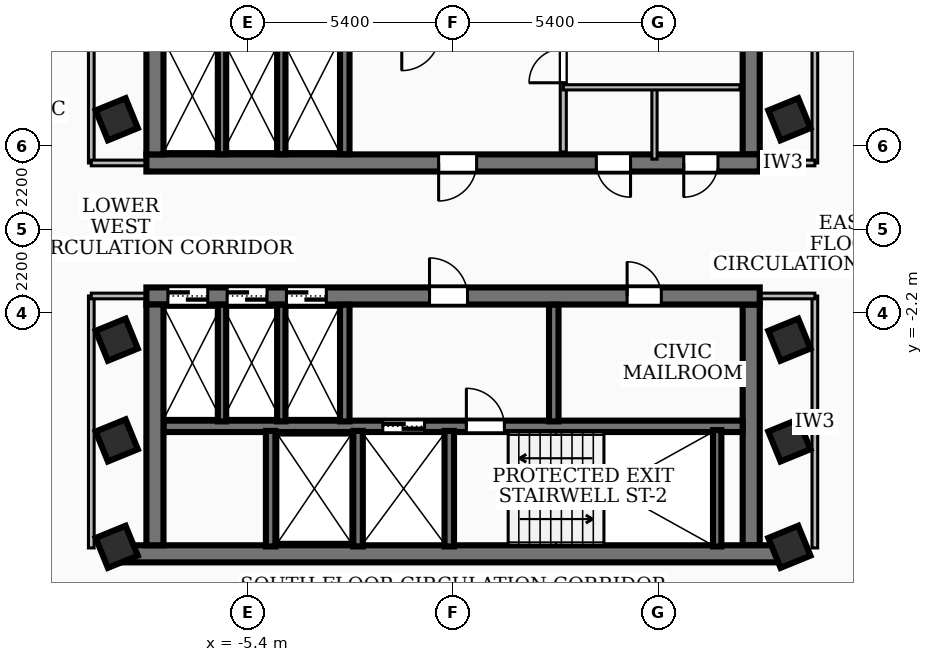
"""IFC4 building model, lengths in metres.
Left out: names, types, materials, properties, quantities, classifications, styles, units other than length and angle.
Written with IfcOpenShell. Run it as: python <this file> out.ifc"""

import sys

from ifc_helpers import new_model, si_unit, direction, frame, frame_2d, origin, origin_2d, place, context, subcontext, project, spatial, rectangle, extrude, element, fill, save


model = new_model("IFC4")
c1 = context("Model", 3, precision=1e-05, world=origin(), true_north=direction((0.0, 1.0)))
c2 = subcontext(c1, "Body", "Model", "MODEL_VIEW")
j1 = project(units=[si_unit("LENGTHUNIT", "METRE"), si_unit("PLANEANGLEUNIT", "RADIAN")], contexts=[c1])
p1 = place(None, origin())
s1 = spatial("IfcSite", under=j1, at=p1, CompositionType="ELEMENT")
p2 = place(p1, origin())
s2 = spatial("IfcBuilding", under=s1, at=p2, CompositionType="ELEMENT")
p3 = place(p2, frame((0.0, 0.0, 177.48)))
s3 = spatial("IfcBuildingStorey", under=s2, at=p3, CompositionType="ELEMENT", Elevation=177.48)
p4 = place(p3, frame((8.07, 1.75, 0.0), z_axis=(0.0, 0.0, 1.0), x_axis=(-1.0, 0.0, 0.0)))
e1 = element("IfcWall", 1, at=p4, inside=s3, PredefinedType="SHEAR", context=c2, shape_type="SweptSolid", body=[
    extrude(rectangle(XDim=16.14, YDim=0.45, at=frame_2d((8.07, 0.0))), origin(), (0.0, 0.0, 1.0), 3.34),
])
p5 = place(p4, frame((7.45, 0.0, 0.0)))
e2 = element("IfcOpeningElement", 2, at=p5, cuts=e1, PredefinedType="OPENING", context=c2, shape_type="SweptSolid", body=[
    extrude(rectangle(XDim=1.0, YDim=2.1, at=frame_2d((0.5, 1.05))), frame((0.0, 0.235, 0.0), z_axis=(0.0, -1.0, 0.0), x_axis=(1.0, 0.0, 0.0)), (0.0, 0.0, 1.0), 0.47),
])
p6 = place(p4, frame((3.4, 0.0, 0.0)))
e3 = element("IfcOpeningElement", 3, at=p6, cuts=e1, PredefinedType="OPENING", context=c2, shape_type="SweptSolid", body=[
    extrude(rectangle(XDim=0.9, YDim=2.06, at=frame_2d((0.45, 1.03))), frame((0.0, 0.235, 0.0), z_axis=(0.0, -1.0, 0.0), x_axis=(1.0, 0.0, 0.0)), (0.0, 0.0, 1.0), 0.47),
])
p7 = place(p4, frame((1.1, 0.0, 0.0)))
e4 = element("IfcOpeningElement", 4, at=p7, cuts=e1, PredefinedType="OPENING", context=c2, shape_type="SweptSolid", body=[
    extrude(rectangle(XDim=0.9, YDim=2.06, at=frame_2d((0.45, 1.03))), frame((0.0, 0.235, 0.0), z_axis=(0.0, -1.0, 0.0), x_axis=(1.0, 0.0, 0.0)), (0.0, 0.0, 1.0), 0.47),
])
for number, where, z_axis, x_axis in (
    (5, (-7.845, 1.975, 0.0), (0.0, 0.0, 1.0), (0.0, 1.0, 0.0)),
    (6, (7.845, 8.31, 0.0), (0.0, 0.0, 1.0), (0.0, -1.0, 0.0)),
):
    element("IfcWall", number, at=place(p3, frame(where, z_axis=z_axis, x_axis=x_axis)), inside=s3, PredefinedType="SHEAR", context=c2, shape_type="SweptSolid", body=[
        extrude(rectangle(XDim=6.335, YDim=0.45, at=frame_2d((3.167, 0.0))), origin(), (0.0, 0.0, 1.0), 3.34),
    ])
p8 = place(p3, frame((8.78, -8.535, 0.0), z_axis=(0.0, 0.0, 1.0), x_axis=(-1.0, 0.0, 0.0)))
e7 = element("IfcWall", 7, at=p8, inside=s3, PredefinedType="SHEAR", context=c2, shape_type="SweptSolid", body=[
    extrude(rectangle(XDim=17.56, YDim=0.45, at=frame_2d((8.78, 0.0))), origin(), (0.0, 0.0, 1.0), 3.34),
])
p9 = place(p3, frame((-8.07, -1.75, 0.0), z_axis=(0.0, 0.0, 1.0), x_axis=(1.0, 0.0, 0.0)))
e8 = element("IfcWall", 8, at=p9, inside=s3, PredefinedType="SHEAR", context=c2, shape_type="SweptSolid", body=[
    extrude(rectangle(XDim=16.14, YDim=0.45, at=frame_2d((8.07, 0.0))), origin(), (0.0, 0.0, 1.0), 3.34),
])
p10 = place(p9, frame((7.45, 0.0, 0.0)))
e9 = element("IfcOpeningElement", 9, at=p10, cuts=e8, PredefinedType="OPENING", context=c2, shape_type="SweptSolid", body=[
    extrude(rectangle(XDim=1.0, YDim=2.1, at=frame_2d((0.5, 1.05))), frame((0.0, 0.235, 0.0), z_axis=(0.0, -1.0, 0.0), x_axis=(1.0, 0.0, 0.0)), (0.0, 0.0, 1.0), 0.47),
])
p11 = place(p9, frame((12.65, 0.0, 0.0)))
e10 = element("IfcOpeningElement", 10, at=p11, cuts=e8, PredefinedType="OPENING", context=c2, shape_type="SweptSolid", body=[
    extrude(rectangle(XDim=0.9, YDim=2.06, at=frame_2d((0.45, 1.03))), frame((0.0, 0.235, 0.0), z_axis=(0.0, -1.0, 0.0), x_axis=(1.0, 0.0, 0.0)), (0.0, 0.0, 1.0), 0.47),
])
p12 = place(p9, frame((0.565, 0.0, 0.0)))
e11 = element("IfcOpeningElement", 11, at=p12, cuts=e8, PredefinedType="OPENING", context=c2, shape_type="SweptSolid", body=[
    extrude(rectangle(XDim=1.05, YDim=2.15, at=frame_2d((0.525, 1.075))), frame((0.0, 0.235, 0.0), z_axis=(0.0, -1.0, 0.0), x_axis=(1.0, 0.0, 0.0)), (0.0, 0.0, 1.0), 0.47),
])
p13 = place(p9, frame((2.125, 0.0, 0.0)))
e12 = element("IfcOpeningElement", 12, at=p13, cuts=e8, PredefinedType="OPENING", context=c2, shape_type="SweptSolid", body=[
    extrude(rectangle(XDim=1.05, YDim=2.15, at=frame_2d((0.525, 1.075))), frame((0.0, 0.235, 0.0), z_axis=(0.0, -1.0, 0.0), x_axis=(1.0, 0.0, 0.0)), (0.0, 0.0, 1.0), 0.47),
])
p14 = place(p9, frame((3.685, 0.0, 0.0)))
e13 = element("IfcOpeningElement", 13, at=p14, cuts=e8, PredefinedType="OPENING", context=c2, shape_type="SweptSolid", body=[
    extrude(rectangle(XDim=1.05, YDim=2.15, at=frame_2d((0.525, 1.075))), frame((0.0, 0.235, 0.0), z_axis=(0.0, -1.0, 0.0), x_axis=(1.0, 0.0, 0.0)), (0.0, 0.0, 1.0), 0.47),
])
for number, where, z_axis, x_axis in (
    (14, (-7.845, -8.31, 0.0), (0.0, 0.0, 1.0), (0.0, 1.0, 0.0)),
    (15, (7.845, -1.975, 0.0), (0.0, 0.0, 1.0), (0.0, -1.0, 0.0)),
):
    element("IfcWall", number, at=place(p3, frame(where, z_axis=z_axis, x_axis=x_axis)), inside=s3, PredefinedType="SHEAR", context=c2, shape_type="SweptSolid", body=[
        extrude(rectangle(XDim=6.335, YDim=0.45, at=frame_2d((3.167, 0.0))), origin(), (0.0, 0.0, 1.0), 3.34),
    ])
p15 = place(p3, frame((-7.62, -5.18, 0.0), z_axis=(0.0, 0.0, 1.0), x_axis=(1.0, 0.0, 0.0)))
e16 = element("IfcWall", 16, at=p15, inside=s3, PredefinedType="SOLIDWALL", context=c2, shape_type="SweptSolid", body=[
    extrude(rectangle(XDim=15.24, YDim=0.3, at=frame_2d((7.62, 0.0))), origin(), (0.0, 0.0, 1.0), 3.34),
])
p16 = place(p15, frame((5.77, 0.0, 0.0)))
e17 = element("IfcOpeningElement", 17, at=p16, cuts=e16, PredefinedType="OPENING", context=c2, shape_type="SweptSolid", body=[
    extrude(rectangle(XDim=1.1, YDim=2.15, at=frame_2d((0.55, 1.075))), frame((0.0, 0.16, 0.0), z_axis=(0.0, -1.0, 0.0), x_axis=(1.0, 0.0, 0.0)), (0.0, 0.0, 1.0), 0.32),
])
p17 = place(p15, frame((7.97, 0.0, 0.0)))
e18 = element("IfcOpeningElement", 18, at=p17, cuts=e16, PredefinedType="OPENING", context=c2, shape_type="SweptSolid", body=[
    extrude(rectangle(XDim=1.0, YDim=2.1, at=frame_2d((0.5, 1.05))), frame((0.0, 0.16, 0.0), z_axis=(0.0, -1.0, 0.0), x_axis=(1.0, 0.0, 0.0)), (0.0, 0.0, 1.0), 0.32),
])
p18 = place(p3, frame((6.95, -8.34, 0.0), z_axis=(0.0, 0.0, 1.0), x_axis=(0.0, 1.0, 0.0)))
e19 = element("IfcWall", 19, at=p18, inside=s3, PredefinedType="SOLIDWALL", context=c2, shape_type="SweptSolid", body=[
    extrude(rectangle(XDim=3.06, YDim=0.22, at=frame_2d((1.53, 0.0))), origin(), (0.0, 0.0, 1.0), 3.34),
])
p19 = place(p3, frame((-2.85, 1.98, 0.0), z_axis=(0.0, 0.0, 1.0), x_axis=(0.0, 1.0, 0.0)))
e20 = element("IfcWall", 20, at=p19, inside=s3, PredefinedType="SOLIDWALL", context=c2, shape_type="SweptSolid", body=[
    extrude(rectangle(XDim=3.07, YDim=0.25, at=frame_2d((1.535, 0.0))), origin(), (0.0, 0.0, 1.0), 3.34),
])
for number, where, z_axis, x_axis in (
    (21, (-0.1, -8.34, 0.0), (0.0, 0.0, 1.0), (0.0, 1.0, 0.0)),
    (22, (-2.5, -8.34, 0.0), (0.0, 0.0, 1.0), (0.0, 1.0, 0.0)),
    (23, (-4.8, -8.34, 0.0), (0.0, 0.0, 1.0), (0.0, 1.0, 0.0)),
):
    element("IfcWall", number, at=place(p3, frame(where, z_axis=z_axis, x_axis=x_axis)), inside=s3, PredefinedType="SOLIDWALL", context=c2, shape_type="SweptSolid", body=[
        extrude(rectangle(XDim=3.04, YDim=0.25, at=frame_2d((1.52, 0.0))), origin(), (0.0, 0.0, 1.0), 3.34),
    ])
for number, where, z_axis, x_axis in (
    (24, (-2.85, -5.05, 0.0), (0.0, 0.0, 1.0), (0.0, 1.0, 0.0)),
    (25, (2.65, -5.05, 0.0), (0.0, 0.0, 1.0), (0.0, 1.0, 0.0)),
):
    element("IfcWall", number, at=place(p3, frame(where, z_axis=z_axis, x_axis=x_axis)), inside=s3, PredefinedType="SOLIDWALL", context=c2, shape_type="SweptSolid", body=[
        extrude(rectangle(XDim=3.07, YDim=0.25, at=frame_2d((1.535, 0.0))), origin(), (0.0, 0.0, 1.0), 3.34),
    ])
for number, where, z_axis, x_axis in (
    (26, (-6.08, 1.98, 0.0), (0.0, 0.0, 1.0), (0.0, 1.0, 0.0)),
    (27, (-4.52, 1.98, 0.0), (0.0, 0.0, 1.0), (0.0, 1.0, 0.0)),
    (28, (-6.08, -5.05, 0.0), (0.0, 0.0, 1.0), (0.0, 1.0, 0.0)),
    (29, (-4.52, -5.05, 0.0), (0.0, 0.0, 1.0), (0.0, 1.0, 0.0)),
):
    element("IfcWall", number, at=place(p3, frame(where, z_axis=z_axis, x_axis=x_axis)), inside=s3, PredefinedType="SOLIDWALL", context=c2, shape_type="SweptSolid", body=[
        extrude(rectangle(XDim=3.07, YDim=0.22, at=frame_2d((1.535, 0.0))), origin(), (0.0, 0.0, 1.0), 3.34),
    ])
for number, where, z_axis, x_axis in (
    (30, (-8.85, -5.55, 0.0), (0.0, 0.0, 1.0), (0.926, 0.378, 0.0)),
    (31, (-8.85, -2.9, 0.0), (0.0, 0.0, 1.0), (0.926, 0.378, 0.0)),
    (32, (-8.85, 2.9, 0.0), (0.0, 0.0, 1.0), (0.926, 0.378, 0.0)),
    (33, (8.85, -5.55, 0.0), (0.0, 0.0, 1.0), (0.926, 0.378, 0.0)),
    (34, (8.85, -2.9, 0.0), (0.0, 0.0, 1.0), (0.926, 0.378, 0.0)),
    (35, (8.85, 2.9, 0.0), (0.0, 0.0, 1.0), (0.926, 0.378, 0.0)),
    (36, (8.85, -8.35, 0.0), (0.0, 0.0, 1.0), (0.926, 0.378, 0.0)),
    (37, (-8.85, -8.35, 0.0), (0.0, 0.0, 1.0), (0.926, 0.378, 0.0)),
):
    element("IfcColumn", number, at=place(p3, frame(where, z_axis=z_axis, x_axis=x_axis)), inside=s3, PredefinedType="COLUMN", context=c2, shape_type="SweptSolid", body=[
        extrude(rectangle(XDim=0.85, YDim=0.85, at=origin_2d()), origin(), (0.0, 0.0, 1.0), 3.6),
    ])
p20 = place(p3, frame((2.9, 2.04, 0.0), z_axis=(0.0, 0.0, 1.0), x_axis=(0.0, 1.0, 0.0)))
e38 = element("IfcWall", 38, at=p20, inside=s3, PredefinedType="PARTITIONING", context=c2, shape_type="SweptSolid", body=[
    extrude(rectangle(XDim=2.94, YDim=0.16, at=frame_2d((1.47, 0.0))), origin(), (0.0, 0.0, 1.0), 2.57),
])
p21 = place(p20, frame((1.82, 0.0, 0.0)))
e39 = element("IfcOpeningElement", 39, at=p21, cuts=e38, PredefinedType="OPENING", context=c2, shape_type="SweptSolid", body=[
    extrude(rectangle(XDim=0.9, YDim=2.06, at=frame_2d((0.45, 1.03))), frame((0.0, 0.09, 0.0), z_axis=(0.0, -1.0, 0.0), x_axis=(1.0, 0.0, 0.0)), (0.0, 0.0, 1.0), 0.18),
])
p22 = place(p3, frame((2.9, 3.74, 0.0), z_axis=(0.0, 0.0, 1.0), x_axis=(1.0, 0.0, 0.0)))
e40 = element("IfcWall", 40, at=p22, inside=s3, PredefinedType="PARTITIONING", context=c2, shape_type="SweptSolid", body=[
    extrude(rectangle(XDim=4.65, YDim=0.138, at=frame_2d((2.325, 0.0))), origin(), (0.0, 0.0, 1.0), 3.34),
])
p23 = place(p3, frame((5.3, 1.85, 0.0), z_axis=(0.0, 0.0, 1.0), x_axis=(0.0, 1.0, 0.0)))
e41 = element("IfcWall", 41, at=p23, inside=s3, PredefinedType="PARTITIONING", context=c2, shape_type="SweptSolid", body=[
    extrude(rectangle(XDim=1.89, YDim=0.138, at=frame_2d((0.945, 0.0))), origin(), (0.0, 0.0, 1.0), 2.57),
])
p24 = place(p3, frame((-9.52, 1.75, 0.0), z_axis=(0.0, 0.0, 1.0), x_axis=(0.0, 1.0, 0.0)))
e42 = element("IfcWall", 42, at=p24, inside=s3, PredefinedType="PARTITIONING", context=c2, shape_type="SweptSolid", body=[
    extrude(rectangle(XDim=6.63, YDim=0.15, at=frame_2d((3.315, 0.0))), origin(), (0.0, 0.0, 1.0), 3.34),
])
p25 = place(p3, frame((-7.85, 1.75, 0.0), z_axis=(0.0, 0.0, 1.0), x_axis=(-1.0, 0.0, 0.0)))
e43 = element("IfcWall", 43, at=p25, inside=s3, PredefinedType="PARTITIONING", context=c2, shape_type="SweptSolid", body=[
    extrude(rectangle(XDim=1.67, YDim=0.15, at=frame_2d((0.835, 0.0))), origin(), (0.0, 0.0, 1.0), 2.57),
])
p26 = place(p3, frame((-9.52, -8.38, 0.0), z_axis=(0.0, 0.0, 1.0), x_axis=(0.0, 1.0, 0.0)))
e44 = element("IfcWall", 44, at=p26, inside=s3, PredefinedType="PARTITIONING", context=c2, shape_type="SweptSolid", body=[
    extrude(rectangle(XDim=6.63, YDim=0.15, at=frame_2d((3.315, 0.0))), origin(), (0.0, 0.0, 1.0), 2.644),
])
p27 = place(p3, frame((-7.85, -1.75, 0.0), z_axis=(0.0, 0.0, 1.0), x_axis=(-1.0, 0.0, 0.0)))
e45 = element("IfcWall", 45, at=p27, inside=s3, PredefinedType="PARTITIONING", context=c2, shape_type="SweptSolid", body=[
    extrude(rectangle(XDim=1.67, YDim=0.15, at=frame_2d((0.835, 0.0))), origin(), (0.0, 0.0, 1.0), 2.57),
])
p28 = place(p3, frame((9.52, 1.75, 0.0), z_axis=(0.0, 0.0, 1.0), x_axis=(0.0, 1.0, 0.0)))
e46 = element("IfcWall", 46, at=p28, inside=s3, PredefinedType="PARTITIONING", context=c2, shape_type="SweptSolid", body=[
    extrude(rectangle(XDim=6.63, YDim=0.15, at=frame_2d((3.315, 0.0))), origin(), (0.0, 0.0, 1.0), 2.644),
])
p29 = place(p3, frame((7.85, 1.75, 0.0), z_axis=(0.0, 0.0, 1.0), x_axis=(1.0, 0.0, 0.0)))
e47 = element("IfcWall", 47, at=p29, inside=s3, PredefinedType="PARTITIONING", context=c2, shape_type="SweptSolid", body=[
    extrude(rectangle(XDim=1.67, YDim=0.15, at=frame_2d((0.835, 0.0))), origin(), (0.0, 0.0, 1.0), 2.57),
])
p30 = place(p3, frame((9.52, -8.38, 0.0), z_axis=(0.0, 0.0, 1.0), x_axis=(0.0, 1.0, 0.0)))
e48 = element("IfcWall", 48, at=p30, inside=s3, PredefinedType="PARTITIONING", context=c2, shape_type="SweptSolid", body=[
    extrude(rectangle(XDim=6.63, YDim=0.15, at=frame_2d((3.315, 0.0))), origin(), (0.0, 0.0, 1.0), 3.34),
])
p31 = place(p3, frame((7.85, -1.75, 0.0), z_axis=(0.0, 0.0, 1.0), x_axis=(1.0, 0.0, 0.0)))
e49 = element("IfcWall", 49, at=p31, inside=s3, PredefinedType="PARTITIONING", context=c2, shape_type="SweptSolid", body=[
    extrude(rectangle(XDim=1.67, YDim=0.15, at=frame_2d((0.835, 0.0))), origin(), (0.0, 0.0, 1.0), 2.57),
])
p32 = place(p3, frame((9.323, 14.973, 0.0), z_axis=(0.0, 0.0, 1.0), x_axis=(0.377891753295, -0.92584978414, 0.0)))
e50 = element("IfcWall", 50, at=p32, inside=s3, PredefinedType="PARTITIONING", context=c2, shape_type="SweptSolid", body=[
    extrude(rectangle(XDim=20.361, YDim=0.11, at=frame_2d((10.18, 0.0))), origin(), (0.0, 0.0, 1.0), 2.644),
])
p33 = place(p32, frame((9.741, 0.0, 0.0)))
e51 = element("IfcOpeningElement", 51, at=p33, cuts=e50, PredefinedType="OPENING", context=c2, shape_type="SweptSolid", body=[
    extrude(rectangle(XDim=1.2, YDim=2.1, at=frame_2d((0.6, 1.05))), frame((0.0, 0.065, 0.0), z_axis=(0.0, -1.0, 0.0), x_axis=(1.0, 0.0, 0.0)), (0.0, 0.0, 1.0), 0.13),
])
p34 = place(p3, frame((-9.323, -14.973, 0.0), z_axis=(0.0, 0.0, 1.0), x_axis=(-0.377891753295, 0.92584978414, 0.0)))
e52 = element("IfcWall", 52, at=p34, inside=s3, PredefinedType="PARTITIONING", context=c2, shape_type="SweptSolid", body=[
    extrude(rectangle(XDim=20.361, YDim=0.11, at=frame_2d((10.18, 0.0))), origin(), (0.0, 0.0, 1.0), 2.644),
])
p35 = place(p34, frame((9.741, 0.0, 0.0)))
e53 = element("IfcOpeningElement", 53, at=p35, cuts=e52, PredefinedType="OPENING", context=c2, shape_type="SweptSolid", body=[
    extrude(rectangle(XDim=1.2, YDim=2.1, at=frame_2d((0.6, 1.05))), frame((0.0, 0.065, 0.0), z_axis=(0.0, -1.0, 0.0), x_axis=(1.0, 0.0, 0.0)), (0.0, 0.0, 1.0), 0.13),
])
p36 = place(p3, frame((14.973, -9.323, 0.0), z_axis=(0.0, 0.0, 1.0), x_axis=(-0.92584978414, -0.377891753295, 0.0)))
e54 = element("IfcWall", 54, at=p36, inside=s3, PredefinedType="PARTITIONING", context=c2, shape_type="SweptSolid", body=[
    extrude(rectangle(XDim=20.361, YDim=0.11, at=frame_2d((10.18, 0.0))), origin(), (0.0, 0.0, 1.0), 2.644),
])
p37 = place(p36, frame((9.741, 0.0, 0.0)))
e55 = element("IfcOpeningElement", 55, at=p37, cuts=e54, PredefinedType="OPENING", context=c2, shape_type="SweptSolid", body=[
    extrude(rectangle(XDim=1.2, YDim=2.1, at=frame_2d((0.6, 1.05))), frame((0.0, 0.065, 0.0), z_axis=(0.0, -1.0, 0.0), x_axis=(1.0, 0.0, 0.0)), (0.0, 0.0, 1.0), 0.13),
])
p38 = place(p5, origin())
e56 = element("IfcDoor", 56, at=p38, inside=s3, OperationType="SINGLE_SWING_RIGHT", PredefinedType="DOOR", context=c2, shape_type="SweptSolid", body=[
    extrude(rectangle(XDim=1.0, YDim=2.1, at=frame_2d((0.5, 1.05))), frame((0.0, 0.025, 0.0), z_axis=(0.0, -1.0, 0.0), x_axis=(1.0, 0.0, 0.0)), (0.0, 0.0, 1.0), 0.05),
])
fill(e2, e56)
p39 = place(p10, origin())
e57 = element("IfcDoor", 57, at=p39, inside=s3, OperationType="SINGLE_SWING_LEFT", PredefinedType="DOOR", context=c2, shape_type="SweptSolid", body=[
    extrude(rectangle(XDim=1.0, YDim=2.1, at=frame_2d((0.5, 1.05))), frame((0.0, 0.025, 0.0), z_axis=(0.0, -1.0, 0.0), x_axis=(1.0, 0.0, 0.0)), (0.0, 0.0, 1.0), 0.05),
])
fill(e9, e57)
p40 = place(p16, origin())
e58 = element("IfcDoor", 58, at=p40, inside=s3, OperationType="DOUBLE_DOOR_SLIDING", PredefinedType="DOOR", context=c2, shape_type="SweptSolid", body=[
    extrude(rectangle(XDim=1.1, YDim=2.15, at=frame_2d((0.55, 1.075))), frame((0.0, 0.025, 0.0), z_axis=(0.0, -1.0, 0.0), x_axis=(1.0, 0.0, 0.0)), (0.0, 0.0, 1.0), 0.05),
])
fill(e17, e58)
p41 = place(p17, origin())
e59 = element("IfcDoor", 59, at=p41, inside=s3, OperationType="SINGLE_SWING_LEFT", PredefinedType="DOOR", context=c2, shape_type="SweptSolid", body=[
    extrude(rectangle(XDim=1.0, YDim=2.1, at=frame_2d((0.5, 1.05))), frame((0.0, 0.025, 0.0), z_axis=(0.0, -1.0, 0.0), x_axis=(1.0, 0.0, 0.0)), (0.0, 0.0, 1.0), 0.05),
])
fill(e18, e59)
p42 = place(p11, origin())
e60 = element("IfcDoor", 60, at=p42, inside=s3, OperationType="SINGLE_SWING_LEFT", PredefinedType="DOOR", context=c2, shape_type="SweptSolid", body=[
    extrude(rectangle(XDim=0.9, YDim=2.06, at=frame_2d((0.45, 1.03))), frame((0.0, 0.025, 0.0), z_axis=(0.0, -1.0, 0.0), x_axis=(1.0, 0.0, 0.0)), (0.0, 0.0, 1.0), 0.05),
])
fill(e10, e60)
p43 = place(p12, origin())
e61 = element("IfcDoor", 61, at=p43, inside=s3, OperationType="DOUBLE_DOOR_SLIDING", PredefinedType="DOOR", context=c2, shape_type="SweptSolid", body=[
    extrude(rectangle(XDim=1.05, YDim=2.15, at=frame_2d((0.525, 1.075))), frame((0.0, 0.025, 0.0), z_axis=(0.0, -1.0, 0.0), x_axis=(1.0, 0.0, 0.0)), (0.0, 0.0, 1.0), 0.05),
])
fill(e11, e61)
p44 = place(p13, origin())
e62 = element("IfcDoor", 62, at=p44, inside=s3, OperationType="DOUBLE_DOOR_SLIDING", PredefinedType="DOOR", context=c2, shape_type="SweptSolid", body=[
    extrude(rectangle(XDim=1.05, YDim=2.15, at=frame_2d((0.525, 1.075))), frame((0.0, 0.025, 0.0), z_axis=(0.0, -1.0, 0.0), x_axis=(1.0, 0.0, 0.0)), (0.0, 0.0, 1.0), 0.05),
])
fill(e12, e62)
p45 = place(p14, origin())
e63 = element("IfcDoor", 63, at=p45, inside=s3, OperationType="DOUBLE_DOOR_SLIDING", PredefinedType="DOOR", context=c2, shape_type="SweptSolid", body=[
    extrude(rectangle(XDim=1.05, YDim=2.15, at=frame_2d((0.525, 1.075))), frame((0.0, 0.025, 0.0), z_axis=(0.0, -1.0, 0.0), x_axis=(1.0, 0.0, 0.0)), (0.0, 0.0, 1.0), 0.05),
])
fill(e13, e63)
p46 = place(p6, origin())
e64 = element("IfcDoor", 64, at=p46, inside=s3, OperationType="SINGLE_SWING_LEFT", PredefinedType="DOOR", context=c2, shape_type="SweptSolid", body=[
    extrude(rectangle(XDim=0.9, YDim=2.06, at=frame_2d((0.45, 1.03))), frame((0.0, 0.025, 0.0), z_axis=(0.0, -1.0, 0.0), x_axis=(1.0, 0.0, 0.0)), (0.0, 0.0, 1.0), 0.05),
])
fill(e3, e64)
p47 = place(p7, origin())
e65 = element("IfcDoor", 65, at=p47, inside=s3, OperationType="SINGLE_SWING_RIGHT", PredefinedType="DOOR", context=c2, shape_type="SweptSolid", body=[
    extrude(rectangle(XDim=0.9, YDim=2.06, at=frame_2d((0.45, 1.03))), frame((0.0, 0.025, 0.0), z_axis=(0.0, -1.0, 0.0), x_axis=(1.0, 0.0, 0.0)), (0.0, 0.0, 1.0), 0.05),
])
fill(e4, e65)
p48 = place(p21, origin())
e66 = element("IfcDoor", 66, at=p48, inside=s3, OperationType="SINGLE_SWING_LEFT", PredefinedType="DOOR", context=c2, shape_type="SweptSolid", body=[
    extrude(rectangle(XDim=0.9, YDim=2.06, at=frame_2d((0.45, 1.03))), frame((0.0, 0.025, 0.0), z_axis=(0.0, -1.0, 0.0), x_axis=(1.0, 0.0, 0.0)), (0.0, 0.0, 1.0), 0.05),
])
fill(e39, e66)
save(model, sys.argv[1])
